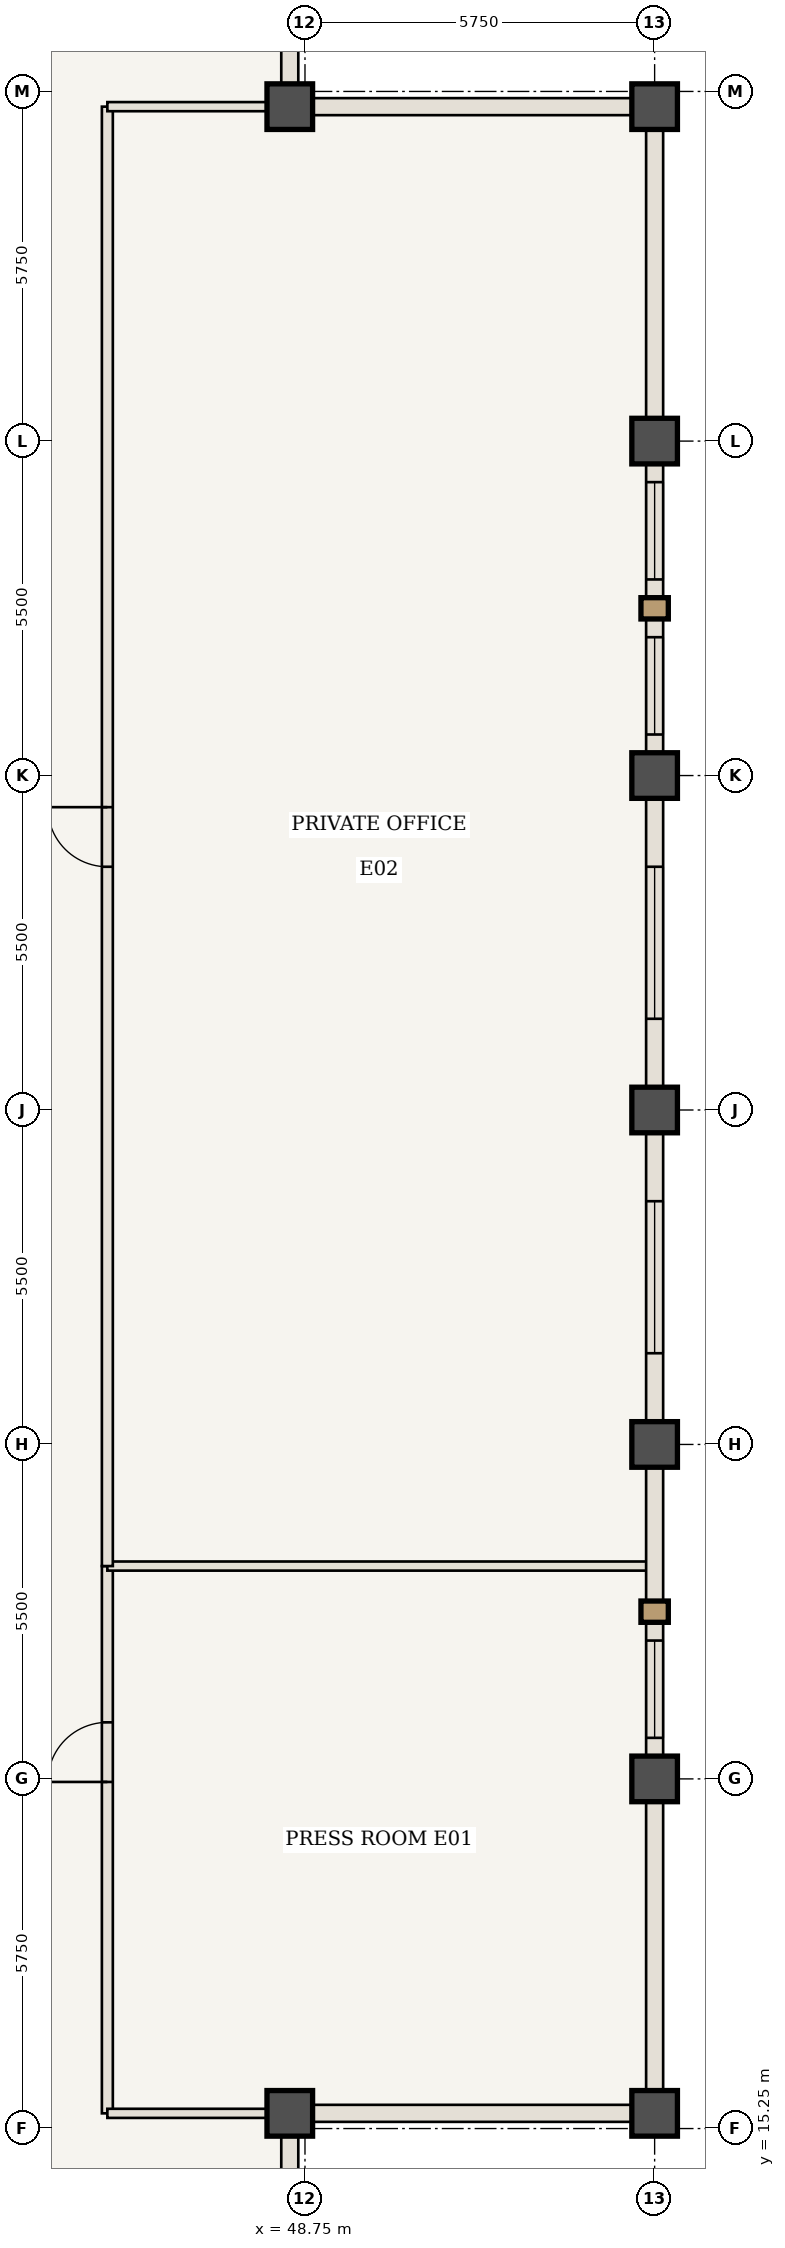
"""IFC4 building model, lengths in metres.
Left out: names, types, materials, properties, quantities, classifications, styles, units other than length and angle.
Written with IfcOpenShell. Run it as: python <this file> out.ifc"""

import sys

from ifc_helpers import new_model, si_unit, direction, frame, frame_2d, origin, origin_2d, place, context, subcontext, project, spatial, rectangle, extrude, element, fill, save


model = new_model("IFC4")
c1 = context("Model", 3, precision=1e-05, world=origin(), true_north=direction((0.0, 1.0)))
c2 = subcontext(c1, "Body", "Model", "MODEL_VIEW")
j1 = project(units=[si_unit("LENGTHUNIT", "METRE"), si_unit("PLANEANGLEUNIT", "RADIAN")], contexts=[c1])
p1 = place(None, origin())
s1 = spatial("IfcSite", under=j1, at=p1, CompositionType="ELEMENT")
p2 = place(p1, origin())
s2 = spatial("IfcBuilding", under=s1, at=p2, CompositionType="ELEMENT")
p3 = place(p2, frame((0.0, 0.0, 281.4)))
s3 = spatial("IfcBuildingStorey", under=s2, at=p3, CompositionType="ELEMENT", Elevation=281.4)
for number, where, z_axis, x_axis in (
    (1, (48.5, 15.5, 0.0), (0.0, 0.0, 1.0), (1.0, 0.0, 0.0)),
    (2, (54.5, 15.5, 0.0), (0.0, 0.0, 1.0), (1.0, 0.0, 0.0)),
    (3, (54.5, 48.5, 0.0), (0.0, 0.0, 1.0), (1.0, 0.0, 0.0)),
    (4, (48.5, 48.5, 0.0), (0.0, 0.0, 1.0), (1.0, 0.0, 0.0)),
    (5, (54.5, 21.0, 0.0), (0.0, 0.0, 1.0), (1.0, 0.0, 0.0)),
    (6, (54.5, 26.5, 0.0), (0.0, 0.0, 1.0), (1.0, 0.0, 0.0)),
    (7, (54.5, 32.0, 0.0), (0.0, 0.0, 1.0), (1.0, 0.0, 0.0)),
    (8, (54.5, 37.5, 0.0), (0.0, 0.0, 1.0), (1.0, 0.0, 0.0)),
    (9, (54.5, 43.0, 0.0), (0.0, 0.0, 1.0), (1.0, 0.0, 0.0)),
):
    element("IfcColumn", number, at=place(p3, frame(where, z_axis=z_axis, x_axis=x_axis)), inside=s3, PredefinedType="COLUMN", context=c2, shape_type="SweptSolid", body=[
        extrude(rectangle(XDim=0.75, YDim=0.75, at=origin_2d()), origin(), (0.0, 0.0, 1.0), 3.85),
    ])
p4 = place(p3, frame((45.5, 15.5, 0.0), z_axis=(0.0, 0.0, 1.0), x_axis=(0.0, 1.0, 0.0)))
e10 = element("IfcWall", 10, at=p4, inside=s3, PredefinedType="STANDARD", context=c2, shape_type="SweptSolid", body=[
    extrude(rectangle(XDim=9.0, YDim=0.18, at=frame_2d((4.5, 0.0))), origin(), (0.0, 0.0, 1.0), 3.685),
])
p5 = place(p4, frame((5.45, 0.0, 0.0)))
e11 = element("IfcOpeningElement", 11, at=p5, cuts=e10, PredefinedType="OPENING", context=c2, shape_type="SweptSolid", body=[
    extrude(rectangle(XDim=0.98, YDim=2.2, at=frame_2d((0.49, 1.1))), frame((0.0, 0.1, 0.0), z_axis=(0.0, -1.0, 0.0), x_axis=(1.0, 0.0, 0.0)), (0.0, 0.0, 1.0), 0.2),
])
p6 = place(p3, frame((45.5, 24.5, 0.0), z_axis=(0.0, 0.0, 1.0), x_axis=(1.0, 0.0, 0.0)))
e12 = element("IfcWall", 12, at=p6, inside=s3, PredefinedType="STANDARD", context=c2, shape_type="SweptSolid", body=[
    extrude(rectangle(XDim=8.94, YDim=0.15, at=frame_2d((4.47, 0.0))), origin(), (0.0, 0.0, 1.0), 3.685),
])
p7 = place(p3, frame((45.5, 24.5, 0.0), z_axis=(0.0, 0.0, 1.0), x_axis=(0.0, 1.0, 0.0)))
e13 = element("IfcWall", 13, at=p7, inside=s3, PredefinedType="STANDARD", context=c2, shape_type="SweptSolid", body=[
    extrude(rectangle(XDim=24.0, YDim=0.18, at=frame_2d((12.0, 0.0))), origin(), (0.0, 0.0, 1.0), 3.685),
])
p8 = place(p7, frame((11.5, 0.0, 0.0)))
e14 = element("IfcOpeningElement", 14, at=p8, cuts=e13, PredefinedType="OPENING", context=c2, shape_type="SweptSolid", body=[
    extrude(rectangle(XDim=0.98, YDim=2.2, at=frame_2d((0.49, 1.1))), frame((0.0, 0.1, 0.0), z_axis=(0.0, -1.0, 0.0), x_axis=(1.0, 0.0, 0.0)), (0.0, 0.0, 1.0), 0.2),
])
for number, where, z_axis, x_axis in (
    (15, (45.5, 15.5, 0.0), (0.0, 0.0, 1.0), (1.0, 0.0, 0.0)),
    (16, (45.5, 48.5, 0.0), (0.0, 0.0, 1.0), (1.0, 0.0, 0.0)),
):
    element("IfcWall", number, at=place(p3, frame(where, z_axis=z_axis, x_axis=x_axis)), inside=s3, PredefinedType="STANDARD", context=c2, shape_type="SweptSolid", body=[
        extrude(rectangle(XDim=3.0, YDim=0.15, at=frame_2d((1.5, 0.0))), origin(), (0.0, 0.0, 1.0), 3.685),
    ])
p9 = place(p3, frame((54.5, 21.0, 0.0), z_axis=(0.0, 0.0, 1.0), x_axis=(0.0, -1.0, 0.0)))
e17 = element("IfcWall", 17, at=p9, inside=s3, PredefinedType="USERDEFINED", context=c2, shape_type="SweptSolid", body=[
    extrude(rectangle(XDim=5.5, YDim=0.28, at=frame_2d((2.75, 0.0))), origin(), (0.0, 0.0, 1.0), 2.985),
])
p10 = place(p3, frame((54.5, 26.5, 0.0), z_axis=(0.0, 0.0, 1.0), x_axis=(0.0, -1.0, 0.0)))
e18 = element("IfcWall", 18, at=p10, inside=s3, PredefinedType="USERDEFINED", context=c2, shape_type="SweptSolid", body=[
    extrude(rectangle(XDim=5.5, YDim=0.28, at=frame_2d((2.75, 0.0))), origin(), (0.0, 0.0, 1.0), 2.985),
])
p11 = place(p10, frame((3.225, 0.0, 0.85)))
e19 = element("IfcOpeningElement", 19, at=p11, cuts=e18, PredefinedType="OPENING", context=c2, shape_type="SweptSolid", body=[
    extrude(rectangle(XDim=1.6, YDim=1.935, at=frame_2d((0.8, 0.968))), frame((0.0, 0.15, 0.0), z_axis=(0.0, -1.0, 0.0), x_axis=(1.0, 0.0, 0.0)), (0.0, 0.0, 1.0), 0.3),
])
p12 = place(p3, frame((54.5, 32.0, 0.0), z_axis=(0.0, 0.0, 1.0), x_axis=(0.0, -1.0, 0.0)))
e20 = element("IfcWall", 20, at=p12, inside=s3, PredefinedType="USERDEFINED", context=c2, shape_type="SweptSolid", body=[
    extrude(rectangle(XDim=5.5, YDim=0.28, at=frame_2d((2.75, 0.0))), origin(), (0.0, 0.0, 1.0), 2.985),
])
p13 = place(p12, frame((1.5, 0.0, 0.85)))
e21 = element("IfcOpeningElement", 21, at=p13, cuts=e20, PredefinedType="OPENING", context=c2, shape_type="SweptSolid", body=[
    extrude(rectangle(XDim=2.5, YDim=1.935, at=frame_2d((1.25, 0.968))), frame((0.0, 0.15, 0.0), z_axis=(0.0, -1.0, 0.0), x_axis=(1.0, 0.0, 0.0)), (0.0, 0.0, 1.0), 0.3),
])
p14 = place(p3, frame((54.5, 37.5, 0.0), z_axis=(0.0, 0.0, 1.0), x_axis=(0.0, -1.0, 0.0)))
e22 = element("IfcWall", 22, at=p14, inside=s3, PredefinedType="USERDEFINED", context=c2, shape_type="SweptSolid", body=[
    extrude(rectangle(XDim=5.5, YDim=0.28, at=frame_2d((2.75, 0.0))), origin(), (0.0, 0.0, 1.0), 2.985),
])
p15 = place(p14, frame((1.5, 0.0, 0.85)))
e23 = element("IfcOpeningElement", 23, at=p15, cuts=e22, PredefinedType="OPENING", context=c2, shape_type="SweptSolid", body=[
    extrude(rectangle(XDim=2.5, YDim=1.935, at=frame_2d((1.25, 0.968))), frame((0.0, 0.15, 0.0), z_axis=(0.0, -1.0, 0.0), x_axis=(1.0, 0.0, 0.0)), (0.0, 0.0, 1.0), 0.3),
])
p16 = place(p3, frame((54.5, 43.0, 0.0), z_axis=(0.0, 0.0, 1.0), x_axis=(0.0, -1.0, 0.0)))
e24 = element("IfcWall", 24, at=p16, inside=s3, PredefinedType="USERDEFINED", context=c2, shape_type="SweptSolid", body=[
    extrude(rectangle(XDim=5.5, YDim=0.28, at=frame_2d((2.75, 0.0))), origin(), (0.0, 0.0, 1.0), 2.985),
])
p17 = place(p16, frame((0.675, 0.0, 0.85)))
e25 = element("IfcOpeningElement", 25, at=p17, cuts=e24, PredefinedType="OPENING", context=c2, shape_type="SweptSolid", body=[
    extrude(rectangle(XDim=1.6, YDim=1.935, at=frame_2d((0.8, 0.968))), frame((0.0, 0.15, 0.0), z_axis=(0.0, -1.0, 0.0), x_axis=(1.0, 0.0, 0.0)), (0.0, 0.0, 1.0), 0.3),
])
p18 = place(p16, frame((3.225, 0.0, 0.85)))
e26 = element("IfcOpeningElement", 26, at=p18, cuts=e24, PredefinedType="OPENING", context=c2, shape_type="SweptSolid", body=[
    extrude(rectangle(XDim=1.6, YDim=1.935, at=frame_2d((0.8, 0.968))), frame((0.0, 0.15, 0.0), z_axis=(0.0, -1.0, 0.0), x_axis=(1.0, 0.0, 0.0)), (0.0, 0.0, 1.0), 0.3),
])
p19 = place(p3, frame((54.5, 48.5, 0.0), z_axis=(0.0, 0.0, 1.0), x_axis=(0.0, -1.0, 0.0)))
e27 = element("IfcWall", 27, at=p19, inside=s3, PredefinedType="USERDEFINED", context=c2, shape_type="SweptSolid", body=[
    extrude(rectangle(XDim=5.5, YDim=0.28, at=frame_2d((2.75, 0.0))), origin(), (0.0, 0.0, 1.0), 2.985),
])
for number, where, z_axis, x_axis in (
    (28, (48.5, 15.5, 0.0), (0.0, 0.0, 1.0), (0.0, -1.0, 0.0)),
    (29, (54.5, 15.5, 0.0), (0.0, 0.0, 1.0), (-1.0, 0.0, 0.0)),
    (30, (48.5, 48.5, 0.0), (0.0, 0.0, 1.0), (1.0, 0.0, 0.0)),
    (31, (48.5, 54.5, 0.0), (0.0, 0.0, 1.0), (0.0, -1.0, 0.0)),
):
    element("IfcWall", number, at=place(p3, frame(where, z_axis=z_axis, x_axis=x_axis)), inside=s3, PredefinedType="USERDEFINED", context=c2, shape_type="SweptSolid", body=[
        extrude(rectangle(XDim=6.0, YDim=0.28, at=frame_2d((3.0, 0.0))), origin(), (0.0, 0.0, 1.0), 2.985),
    ])
p20 = place(p5, origin())
e32 = element("IfcDoor", 32, at=p20, inside=s3, OperationType="SINGLE_SWING_LEFT", PredefinedType="DOOR", context=c2, shape_type="SweptSolid", body=[
    extrude(rectangle(XDim=0.98, YDim=2.2, at=frame_2d((0.49, 1.1))), frame((0.0, 0.025, 0.0), z_axis=(0.0, -1.0, 0.0), x_axis=(1.0, 0.0, 0.0)), (0.0, 0.0, 1.0), 0.05),
])
fill(e11, e32)
p21 = place(p8, origin())
e33 = element("IfcDoor", 33, at=p21, inside=s3, OperationType="SINGLE_SWING_RIGHT", PredefinedType="DOOR", context=c2, shape_type="SweptSolid", body=[
    extrude(rectangle(XDim=0.98, YDim=2.2, at=frame_2d((0.49, 1.1))), frame((0.0, 0.025, 0.0), z_axis=(0.0, -1.0, 0.0), x_axis=(1.0, 0.0, 0.0)), (0.0, 0.0, 1.0), 0.05),
])
fill(e14, e33)
p22 = place(p11, origin())
e34 = element("IfcWindow", 34, at=p22, inside=s3, PartitioningType="SINGLE_PANEL", PredefinedType="WINDOW", context=c2, shape_type="SweptSolid", body=[
    extrude(rectangle(XDim=1.6, YDim=1.935, at=frame_2d((0.8, 0.968))), frame((0.0, 0.03, 0.0), z_axis=(0.0, -1.0, 0.0), x_axis=(1.0, 0.0, 0.0)), (0.0, 0.0, 1.0), 0.06),
])
fill(e19, e34)
p23 = place(p13, origin())
e35 = element("IfcWindow", 35, at=p23, inside=s3, PartitioningType="SINGLE_PANEL", PredefinedType="WINDOW", context=c2, shape_type="SweptSolid", body=[
    extrude(rectangle(XDim=2.5, YDim=1.935, at=frame_2d((1.25, 0.968))), frame((0.0, 0.03, 0.0), z_axis=(0.0, -1.0, 0.0), x_axis=(1.0, 0.0, 0.0)), (0.0, 0.0, 1.0), 0.06),
])
fill(e21, e35)
p24 = place(p15, origin())
e36 = element("IfcWindow", 36, at=p24, inside=s3, PartitioningType="SINGLE_PANEL", PredefinedType="WINDOW", context=c2, shape_type="SweptSolid", body=[
    extrude(rectangle(XDim=2.5, YDim=1.935, at=frame_2d((1.25, 0.968))), frame((0.0, 0.03, 0.0), z_axis=(0.0, -1.0, 0.0), x_axis=(1.0, 0.0, 0.0)), (0.0, 0.0, 1.0), 0.06),
])
fill(e23, e36)
p25 = place(p17, origin())
e37 = element("IfcWindow", 37, at=p25, inside=s3, PartitioningType="SINGLE_PANEL", PredefinedType="WINDOW", context=c2, shape_type="SweptSolid", body=[
    extrude(rectangle(XDim=1.6, YDim=1.935, at=frame_2d((0.8, 0.968))), frame((0.0, 0.03, 0.0), z_axis=(0.0, -1.0, 0.0), x_axis=(1.0, 0.0, 0.0)), (0.0, 0.0, 1.0), 0.06),
])
fill(e25, e37)
p26 = place(p18, origin())
e38 = element("IfcWindow", 38, at=p26, inside=s3, PartitioningType="SINGLE_PANEL", PredefinedType="WINDOW", context=c2, shape_type="SweptSolid", body=[
    extrude(rectangle(XDim=1.6, YDim=1.935, at=frame_2d((0.8, 0.968))), frame((0.0, 0.03, 0.0), z_axis=(0.0, -1.0, 0.0), x_axis=(1.0, 0.0, 0.0)), (0.0, 0.0, 1.0), 0.06),
])
fill(e26, e38)
save(model, sys.argv[1])
